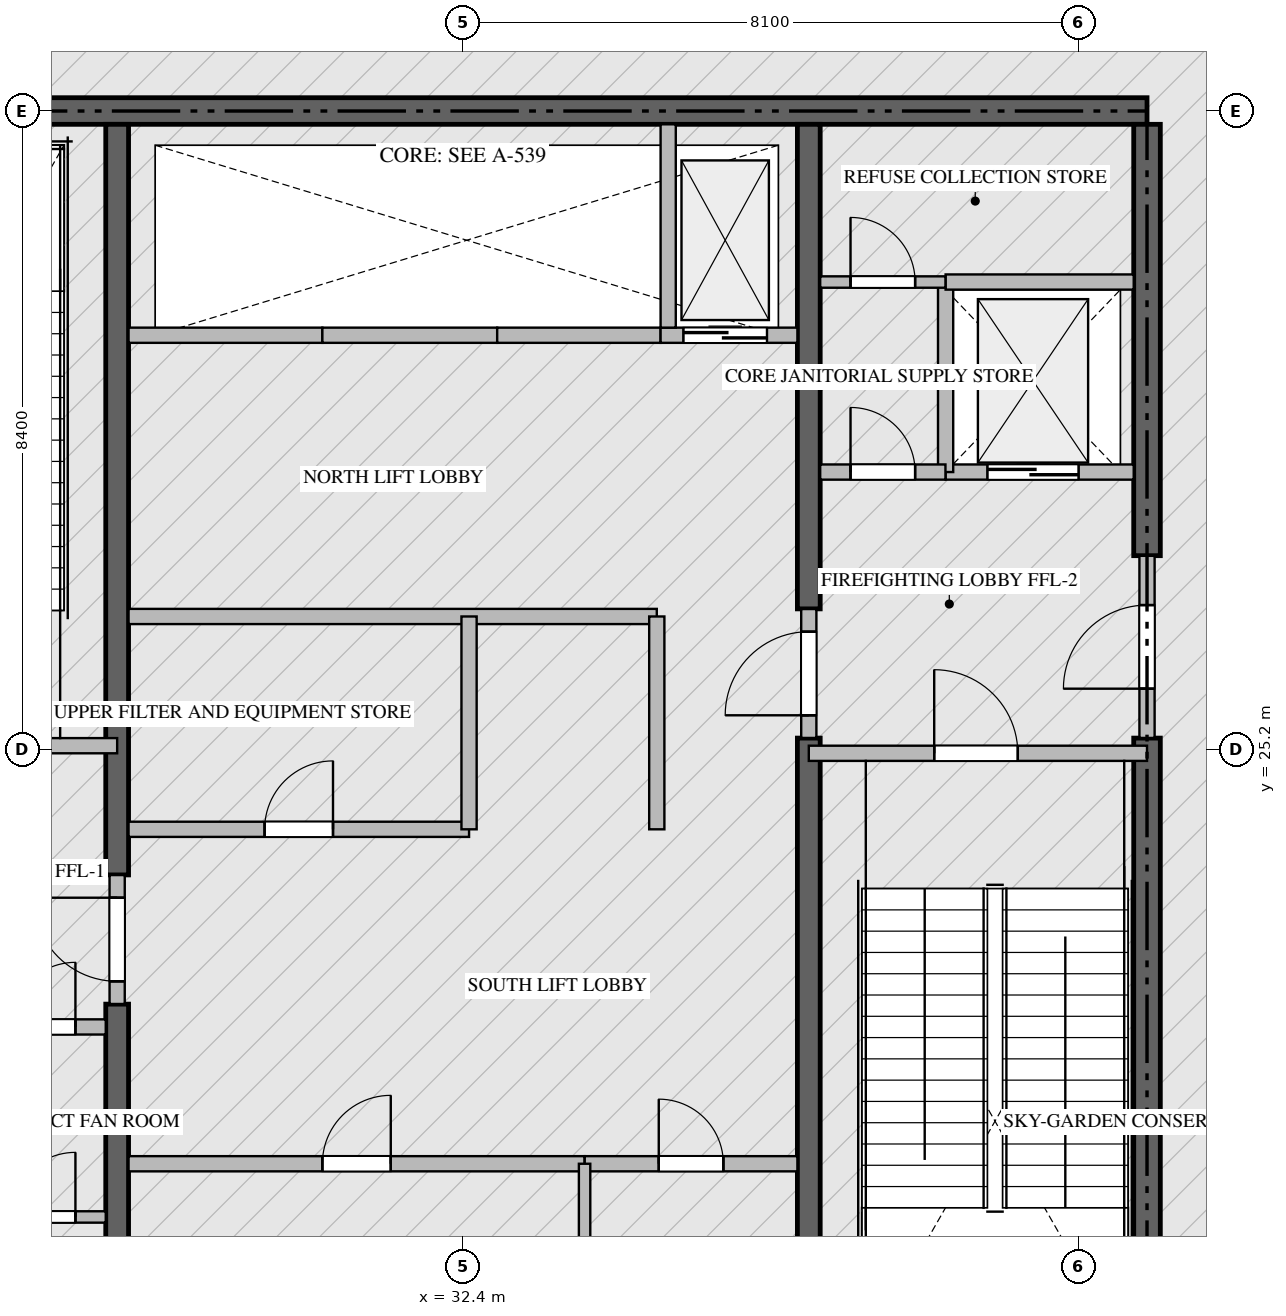
"""IFC4 building model, lengths in metres.
Left out: names, types, materials, properties, quantities, classifications, styles, units other than length and angle.
Written with IfcOpenShell. Run it as: python <this file> out.ifc"""

import sys

from ifc_helpers import new_model, si_unit, direction, frame, frame_2d, origin, place, context, subcontext, project, spatial, rectangle, extrude, source, transform, mapped, element, fill, save


model = new_model("IFC4")
c1 = context("Model", 3, precision=1e-05, world=origin(), true_north=direction((0.0, 1.0)))
c2 = subcontext(c1, "Body", "Model", "MODEL_VIEW")
j1 = project(units=[si_unit("LENGTHUNIT", "METRE"), si_unit("PLANEANGLEUNIT", "RADIAN")], contexts=[c1])
p1 = place(None, origin())
s1 = spatial("IfcSite", under=j1, at=p1, CompositionType="ELEMENT")
p2 = place(p1, origin())
s2 = spatial("IfcBuilding", under=s1, at=p2, CompositionType="ELEMENT")
p3 = place(p2, frame((0.0, 0.0, 359.75)))
s3 = spatial("IfcBuildingStorey", under=s2, at=p3, CompositionType="ELEMENT", Elevation=359.75)
p4 = place(p3, frame((41.4, 33.6, -0.36), z_axis=(0.0, 0.0, 1.0), x_axis=(-1.0, 0.0, 0.0)))
e1 = element("IfcWall", 1, at=p4, inside=s3, PredefinedType="SHEAR", context=c2, shape_type="SweptSolid", body=[
    extrude(rectangle(XDim=18.0, YDim=0.35, at=frame_2d((9.0, 0.0))), origin(), (0.0, 0.0, 1.0), 5.998),
])
p5 = place(p3, frame((41.4, 16.975, -0.36), z_axis=(0.0, 0.0, 1.0), x_axis=(0.0, 1.0, 0.0)))
e2 = element("IfcWall", 2, at=p5, inside=s3, PredefinedType="SHEAR", context=c2, shape_type="SweptSolid", body=[
    extrude(rectangle(XDim=8.375, YDim=0.35, at=frame_2d((4.188, 0.0))), origin(), (0.0, 0.0, 1.0), 5.998),
])
p6 = place(p3, frame((41.4, 27.75, -0.36), z_axis=(0.0, 0.0, 1.0), x_axis=(0.0, 1.0, 0.0)))
e3 = element("IfcWall", 3, at=p6, inside=s3, PredefinedType="SHEAR", context=c2, shape_type="SweptSolid", body=[
    extrude(rectangle(XDim=5.675, YDim=0.35, at=frame_2d((2.837, 0.0))), origin(), (0.0, 0.0, 1.0), 5.998),
])
p7 = place(p3, frame((27.85, 16.975, -0.36), z_axis=(0.0, 0.0, 1.0), x_axis=(0.0, 1.0, 0.0)))
e4 = element("IfcWall", 4, at=p7, inside=s3, PredefinedType="SHEAR", context=c2, shape_type="SweptSolid", body=[
    extrude(rectangle(XDim=4.875, YDim=0.3, at=frame_2d((2.438, 0.0))), origin(), (0.0, 0.0, 1.0), 5.998),
])
p8 = place(p3, frame((27.85, 23.55, -0.36), z_axis=(0.0, 0.0, 1.0), x_axis=(0.0, 1.0, 0.0)))
e5 = element("IfcWall", 5, at=p8, inside=s3, PredefinedType="SHEAR", context=c2, shape_type="SweptSolid", body=[
    extrude(rectangle(XDim=9.875, YDim=0.3, at=frame_2d((4.938, 0.0))), origin(), (0.0, 0.0, 1.0), 5.998),
])
p9 = place(p3, frame((36.95, 16.975, -0.36), z_axis=(0.0, 0.0, 1.0), x_axis=(0.0, 1.0, 0.0)))
e6 = element("IfcWall", 6, at=p9, inside=s3, PredefinedType="SHEAR", context=c2, shape_type="SweptSolid", body=[
    extrude(rectangle(XDim=8.375, YDim=0.3, at=frame_2d((4.188, 0.0))), origin(), (0.0, 0.0, 1.0), 5.998),
])
p10 = place(p3, frame((36.95, 27.05, -0.36), z_axis=(0.0, 0.0, 1.0), x_axis=(0.0, 1.0, 0.0)))
e7 = element("IfcWall", 7, at=p10, inside=s3, PredefinedType="SHEAR", context=c2, shape_type="SweptSolid", body=[
    extrude(rectangle(XDim=6.375, YDim=0.3, at=frame_2d((3.188, 0.0))), origin(), (0.0, 0.0, 1.0), 5.998),
])
p11 = place(p3, frame((23.4, 25.25, 0.0), z_axis=(0.0, 0.0, 1.0), x_axis=(1.0, 0.0, 0.0)))
e8 = element("IfcWall", 8, at=p11, inside=s3, PredefinedType="STANDARD", context=c2, shape_type="SweptSolid", body=[
    extrude(rectangle(XDim=4.45, YDim=0.2, at=frame_2d((2.225, 0.0))), origin(), (0.0, 0.0, 1.0), 5.64),
])
p12 = place(p11, frame((1.65, 0.0, 0.0)))
e9 = element("IfcOpeningElement", 9, at=p12, cuts=e8, PredefinedType="OPENING", context=c2, shape_type="SweptSolid", body=[
    extrude(rectangle(XDim=1.1, YDim=2.15, at=frame_2d((0.55, 1.075))), frame((0.0, 0.11, 0.0), z_axis=(0.0, -1.0, 0.0), x_axis=(1.0, 0.0, 0.0)), (0.0, 0.0, 1.0), 0.22),
])
p13 = place(p3, frame((36.95, 25.15, 0.0), z_axis=(0.0, 0.0, 1.0), x_axis=(1.0, 0.0, 0.0)))
e10 = element("IfcWall", 10, at=p13, inside=s3, PredefinedType="STANDARD", context=c2, shape_type="SweptSolid", body=[
    extrude(rectangle(XDim=4.45, YDim=0.2, at=frame_2d((2.225, 0.0))), origin(), (0.0, 0.0, 1.0), 5.64),
])
p14 = place(p13, frame((1.65, 0.0, 0.0)))
e11 = element("IfcOpeningElement", 11, at=p14, cuts=e10, PredefinedType="OPENING", context=c2, shape_type="SweptSolid", body=[
    extrude(rectangle(XDim=1.1, YDim=2.15, at=frame_2d((0.55, 1.075))), frame((0.0, 0.11, 0.0), z_axis=(0.0, -1.0, 0.0), x_axis=(1.0, 0.0, 0.0)), (0.0, 0.0, 1.0), 0.22),
])
p15 = place(p3, frame((38.75, 28.85, 0.0), z_axis=(0.0, 0.0, 1.0), x_axis=(1.0, 0.0, 0.0)))
e12 = element("IfcWall", 12, at=p15, inside=s3, PredefinedType="STANDARD", context=c2, shape_type="SweptSolid", body=[
    extrude(rectangle(XDim=2.475, YDim=0.2, at=frame_2d((1.238, 0.0))), origin(), (0.0, 0.0, 1.0), 5.64),
])
p16 = place(p15, frame((0.55, 0.0, 0.0)))
e13 = element("IfcOpeningElement", 13, at=p16, cuts=e12, PredefinedType="OPENING", context=c2, shape_type="SweptSolid", body=[
    extrude(rectangle(XDim=1.2, YDim=2.2, at=frame_2d((0.6, 1.1))), frame((0.0, 0.11, 0.0), z_axis=(0.0, -1.0, 0.0), x_axis=(1.0, 0.0, 0.0)), (0.0, 0.0, 1.0), 0.22),
])
p17 = place(p3, frame((28.0, 30.65, 0.0), z_axis=(0.0, 0.0, 1.0), x_axis=(1.0, 0.0, 0.0)))
e14 = element("IfcWall", 14, at=p17, inside=s3, PredefinedType="STANDARD", context=c2, shape_type="SweptSolid", body=[
    extrude(rectangle(XDim=2.55, YDim=0.2, at=frame_2d((1.275, 0.0))), origin(), (0.0, 0.0, 1.0), 5.64),
])
p18 = place(p3, frame((30.55, 30.65, 0.0), z_axis=(0.0, 0.0, 1.0), x_axis=(1.0, 0.0, 0.0)))
e15 = element("IfcWall", 15, at=p18, inside=s3, PredefinedType="STANDARD", context=c2, shape_type="SweptSolid", body=[
    extrude(rectangle(XDim=2.3, YDim=0.2, at=frame_2d((1.15, 0.0))), origin(), (0.0, 0.0, 1.0), 5.64),
])
p19 = place(p3, frame((32.85, 30.65, 0.0), z_axis=(0.0, 0.0, 1.0), x_axis=(1.0, 0.0, 0.0)))
e16 = element("IfcWall", 16, at=p19, inside=s3, PredefinedType="STANDARD", context=c2, shape_type="SweptSolid", body=[
    extrude(rectangle(XDim=2.15, YDim=0.2, at=frame_2d((1.075, 0.0))), origin(), (0.0, 0.0, 1.0), 5.64),
])
p20 = place(p3, frame((35.0, 30.65, 0.0), z_axis=(0.0, 0.0, 1.0), x_axis=(1.0, 0.0, 0.0)))
e17 = element("IfcWall", 17, at=p20, inside=s3, PredefinedType="STANDARD", context=c2, shape_type="SweptSolid", body=[
    extrude(rectangle(XDim=1.8, YDim=0.2, at=frame_2d((0.9, 0.0))), origin(), (0.0, 0.0, 1.0), 5.64),
])
p21 = place(p20, frame((0.3, 0.0, 0.0)))
e18 = element("IfcOpeningElement", 18, at=p21, cuts=e17, PredefinedType="OPENING", context=c2, shape_type="SweptSolid", body=[
    extrude(rectangle(XDim=1.1, YDim=2.2, at=frame_2d((0.55, 1.1))), frame((0.0, 0.11, 0.0), z_axis=(0.0, -1.0, 0.0), x_axis=(1.0, 0.0, 0.0)), (0.0, 0.0, 1.0), 0.22),
])
p22 = place(p3, frame((35.1, 30.75, 0.0), z_axis=(0.0, 0.0, 1.0), x_axis=(0.0, 1.0, 0.0)))
e19 = element("IfcWall", 19, at=p22, inside=s3, PredefinedType="STANDARD", context=c2, shape_type="SweptSolid", body=[
    extrude(rectangle(XDim=2.675, YDim=0.2, at=frame_2d((1.337, 0.0))), origin(), (0.0, 0.0, 1.0), 5.64),
])
p23 = place(p3, frame((26.052, 21.55, 0.0), z_axis=(0.0, 0.0, 1.0), x_axis=(1.0, 0.0, 0.0)))
e20 = element("IfcWall", 20, at=p23, inside=s3, PredefinedType="STANDARD", context=c2, shape_type="SweptSolid", body=[
    extrude(rectangle(XDim=1.648, YDim=0.2, at=frame_2d((0.824, 0.0))), origin(), (0.0, 0.0, 1.0), 5.64),
])
p24 = place(p23, frame((0.399, 0.0, 0.0)))
e21 = element("IfcOpeningElement", 21, at=p24, cuts=e20, PredefinedType="OPENING", context=c2, shape_type="SweptSolid", body=[
    extrude(rectangle(XDim=0.85, YDim=2.1, at=frame_2d((0.425, 1.05))), frame((0.0, 0.11, 0.0), z_axis=(0.0, -1.0, 0.0), x_axis=(1.0, 0.0, 0.0)), (0.0, 0.0, 1.0), 0.22),
])
p25 = place(p3, frame((38.75, 28.85, 0.0), z_axis=(0.0, 0.0, 1.0), x_axis=(0.0, 1.0, 0.0)))
e22 = element("IfcWall", 22, at=p25, inside=s3, PredefinedType="STANDARD", context=c2, shape_type="SweptSolid", body=[
    extrude(rectangle(XDim=2.5, YDim=0.2, at=frame_2d((1.25, 0.0))), origin(), (0.0, 0.0, 1.0), 5.64),
])
p26 = place(p3, frame((38.75, 31.35, 0.0), z_axis=(0.0, 0.0, 1.0), x_axis=(1.0, 0.0, 0.0)))
e23 = element("IfcWall", 23, at=p26, inside=s3, PredefinedType="STANDARD", context=c2, shape_type="SweptSolid", body=[
    extrude(rectangle(XDim=2.475, YDim=0.2, at=frame_2d((1.238, 0.0))), origin(), (0.0, 0.0, 1.0), 5.64),
])
p27 = place(p3, frame((37.1, 28.85, 0.0), z_axis=(0.0, 0.0, 1.0), x_axis=(1.0, 0.0, 0.0)))
e24 = element("IfcWall", 24, at=p27, inside=s3, PredefinedType="STANDARD", context=c2, shape_type="SweptSolid", body=[
    extrude(rectangle(XDim=1.648, YDim=0.2, at=frame_2d((0.824, 0.0))), origin(), (0.0, 0.0, 1.0), 5.64),
])
p28 = place(p27, frame((0.399, 0.0, 0.0)))
e25 = element("IfcOpeningElement", 25, at=p28, cuts=e24, PredefinedType="OPENING", context=c2, shape_type="SweptSolid", body=[
    extrude(rectangle(XDim=0.85, YDim=2.1, at=frame_2d((0.425, 1.05))), frame((0.0, 0.11, 0.0), z_axis=(0.0, -1.0, 0.0), x_axis=(1.0, 0.0, 0.0)), (0.0, 0.0, 1.0), 0.22),
])
p29 = place(p3, frame((41.4, 25.352, 0.0), z_axis=(0.0, 0.0, 1.0), x_axis=(0.0, 1.0, 0.0)))
e26 = element("IfcWall", 26, at=p29, inside=s3, PredefinedType="STANDARD", context=c2, shape_type="SweptSolid", body=[
    extrude(rectangle(XDim=2.396, YDim=0.2, at=frame_2d((1.198, 0.0))), origin(), (0.0, 0.0, 1.0), 5.64),
])
p30 = place(p29, frame((0.648, 0.0, 0.0)))
e27 = element("IfcOpeningElement", 27, at=p30, cuts=e26, PredefinedType="OPENING", context=c2, shape_type="SweptSolid", body=[
    extrude(rectangle(XDim=1.1, YDim=2.15, at=frame_2d((0.55, 1.075))), frame((0.0, 0.11, 0.0), z_axis=(0.0, -1.0, 0.0), x_axis=(1.0, 0.0, 0.0)), (0.0, 0.0, 1.0), 0.22),
])
p31 = place(p3, frame((27.85, 21.852, 0.0), z_axis=(0.0, 0.0, 1.0), x_axis=(0.0, 1.0, 0.0)))
e28 = element("IfcWall", 28, at=p31, inside=s3, PredefinedType="STANDARD", context=c2, shape_type="SweptSolid", body=[
    extrude(rectangle(XDim=1.696, YDim=0.2, at=frame_2d((0.848, 0.0))), origin(), (0.0, 0.0, 1.0), 5.64),
])
p32 = place(p31, frame((0.298, 0.0, 0.0)))
e29 = element("IfcOpeningElement", 29, at=p32, cuts=e28, PredefinedType="OPENING", context=c2, shape_type="SweptSolid", body=[
    extrude(rectangle(XDim=1.1, YDim=2.15, at=frame_2d((0.55, 1.075))), frame((0.0, 0.11, 0.0), z_axis=(0.0, -1.0, 0.0), x_axis=(1.0, 0.0, 0.0)), (0.0, 0.0, 1.0), 0.22),
])
p33 = place(p3, frame((36.95, 25.352, 0.0), z_axis=(0.0, 0.0, 1.0), x_axis=(0.0, 1.0, 0.0)))
e30 = element("IfcWall", 30, at=p33, inside=s3, PredefinedType="STANDARD", context=c2, shape_type="SweptSolid", body=[
    extrude(rectangle(XDim=1.696, YDim=0.2, at=frame_2d((0.848, 0.0))), origin(), (0.0, 0.0, 1.0), 5.64),
])
p34 = place(p33, frame((0.298, 0.0, 0.0)))
e31 = element("IfcOpeningElement", 31, at=p34, cuts=e30, PredefinedType="OPENING", context=c2, shape_type="SweptSolid", body=[
    extrude(rectangle(XDim=1.1, YDim=2.15, at=frame_2d((0.55, 1.075))), frame((0.0, 0.11, 0.0), z_axis=(0.0, -1.0, 0.0), x_axis=(1.0, 0.0, 0.0)), (0.0, 0.0, 1.0), 0.22),
])
p35 = place(p3, frame((26.052, 19.05, 0.0), z_axis=(0.0, 0.0, 1.0), x_axis=(1.0, 0.0, 0.0)))
e32 = element("IfcWall", 32, at=p35, inside=s3, PredefinedType="PARTITIONING", context=c2, shape_type="SweptSolid", body=[
    extrude(rectangle(XDim=1.648, YDim=0.15, at=frame_2d((0.824, 0.0))), origin(), (0.0, 0.0, 1.0), 5.64),
])
p36 = place(p35, frame((0.399, 0.0, 0.0)))
e33 = element("IfcOpeningElement", 33, at=p36, cuts=e32, PredefinedType="OPENING", context=c2, shape_type="SweptSolid", body=[
    extrude(rectangle(XDim=0.85, YDim=2.1, at=frame_2d((0.425, 1.05))), frame((0.0, 0.085, 0.0), z_axis=(0.0, -1.0, 0.0), x_axis=(1.0, 0.0, 0.0)), (0.0, 0.0, 1.0), 0.17),
])
p37 = place(p3, frame((37.1, 31.35, 0.0), z_axis=(0.0, 0.0, 1.0), x_axis=(1.0, 0.0, 0.0)))
e34 = element("IfcWall", 34, at=p37, inside=s3, PredefinedType="PARTITIONING", context=c2, shape_type="SweptSolid", body=[
    extrude(rectangle(XDim=1.648, YDim=0.15, at=frame_2d((0.824, 0.0))), origin(), (0.0, 0.0, 1.0), 5.64),
])
p38 = place(p37, frame((0.399, 0.0, 0.0)))
e35 = element("IfcOpeningElement", 35, at=p38, cuts=e34, PredefinedType="OPENING", context=c2, shape_type="SweptSolid", body=[
    extrude(rectangle(XDim=0.85, YDim=2.1, at=frame_2d((0.425, 1.05))), frame((0.0, 0.085, 0.0), z_axis=(0.0, -1.0, 0.0), x_axis=(1.0, 0.0, 0.0)), (0.0, 0.0, 1.0), 0.17),
])
p39 = place(p3, frame((28.0, 19.75, 0.0), z_axis=(0.0, 0.0, 1.0), x_axis=(1.0, 0.0, 0.0)))
e36 = element("IfcWall", 36, at=p39, inside=s3, PredefinedType="STANDARD", context=c2, shape_type="SweptSolid", body=[
    extrude(rectangle(XDim=6.0, YDim=0.2, at=frame_2d((3.0, 0.0))), origin(), (0.0, 0.0, 1.0), 5.64),
])
p40 = place(p39, frame((2.55, 0.0, 0.0)))
e37 = element("IfcOpeningElement", 37, at=p40, cuts=e36, PredefinedType="OPENING", context=c2, shape_type="SweptSolid", body=[
    extrude(rectangle(XDim=0.9, YDim=2.1, at=frame_2d((0.45, 1.05))), frame((0.0, 0.11, 0.0), z_axis=(0.0, -1.0, 0.0), x_axis=(1.0, 0.0, 0.0)), (0.0, 0.0, 1.0), 0.22),
])
p41 = place(p3, frame((34.002, 19.75, 0.0), z_axis=(0.0, 0.0, 1.0), x_axis=(1.0, 0.0, 0.0)))
e38 = element("IfcWall", 38, at=p41, inside=s3, PredefinedType="STANDARD", context=c2, shape_type="SweptSolid", body=[
    extrude(rectangle(XDim=2.798, YDim=0.2, at=frame_2d((1.399, 0.0))), origin(), (0.0, 0.0, 1.0), 5.64),
])
p42 = place(p41, frame((0.974, 0.0, 0.0)))
e39 = element("IfcOpeningElement", 39, at=p42, cuts=e38, PredefinedType="OPENING", context=c2, shape_type="SweptSolid", body=[
    extrude(rectangle(XDim=0.85, YDim=2.1, at=frame_2d((0.425, 1.05))), frame((0.0, 0.11, 0.0), z_axis=(0.0, -1.0, 0.0), x_axis=(1.0, 0.0, 0.0)), (0.0, 0.0, 1.0), 0.22),
])
p43 = place(p3, frame((34.0, 17.02, 0.0), z_axis=(0.0, 0.0, 1.0), x_axis=(0.0, 1.0, 0.0)))
e40 = element("IfcWall", 40, at=p43, inside=s3, PredefinedType="PARTITIONING", context=c2, shape_type="SweptSolid", body=[
    extrude(rectangle(XDim=2.73, YDim=0.15, at=frame_2d((1.365, 0.0))), origin(), (0.0, 0.0, 1.0), 5.64),
])
p44 = place(p3, frame((28.0, 26.95, 0.0), z_axis=(0.0, 0.0, 1.0), x_axis=(1.0, 0.0, 0.0)))
e41 = element("IfcWall", 41, at=p44, inside=s3, PredefinedType="STANDARD", context=c2, shape_type="SweptSolid", body=[
    extrude(rectangle(XDim=6.95, YDim=0.2, at=frame_2d((3.475, 0.0))), origin(), (0.0, 0.0, 1.0), 5.64),
])
p45 = place(p3, frame((34.95, 24.15, 0.0), z_axis=(0.0, 0.0, 1.0), x_axis=(0.0, 1.0, 0.0)))
e42 = element("IfcWall", 42, at=p45, inside=s3, PredefinedType="STANDARD", context=c2, shape_type="SweptSolid", body=[
    extrude(rectangle(XDim=2.8, YDim=0.2, at=frame_2d((1.4, 0.0))), origin(), (0.0, 0.0, 1.0), 5.64),
])
p46 = place(p3, frame((28.0, 24.15, 0.0), z_axis=(0.0, 0.0, 1.0), x_axis=(1.0, 0.0, 0.0)))
e43 = element("IfcWall", 43, at=p46, inside=s3, PredefinedType="STANDARD", context=c2, shape_type="SweptSolid", body=[
    extrude(rectangle(XDim=4.48, YDim=0.2, at=frame_2d((2.24, 0.0))), origin(), (0.0, 0.0, 1.0), 5.64),
])
p47 = place(p46, frame((1.79, 0.0, 0.0)))
e44 = element("IfcOpeningElement", 44, at=p47, cuts=e43, PredefinedType="OPENING", context=c2, shape_type="SweptSolid", body=[
    extrude(rectangle(XDim=0.9, YDim=2.1, at=frame_2d((0.45, 1.05))), frame((0.0, 0.11, 0.0), z_axis=(0.0, -1.0, 0.0), x_axis=(1.0, 0.0, 0.0)), (0.0, 0.0, 1.0), 0.22),
])
p48 = place(p3, frame((32.48, 24.15, 0.0), z_axis=(0.0, 0.0, 1.0), x_axis=(0.0, 1.0, 0.0)))
e45 = element("IfcWall", 45, at=p48, inside=s3, PredefinedType="STANDARD", context=c2, shape_type="SweptSolid", body=[
    extrude(rectangle(XDim=2.8, YDim=0.2, at=frame_2d((1.4, 0.0))), origin(), (0.0, 0.0, 1.0), 5.64),
])
m1 = source(origin(), c2, "Body", "SweptSolid", [
    extrude(rectangle(XDim=1.1, YDim=2.15, at=frame_2d((0.55, 1.075))), frame((0.0, 0.025, 0.0), z_axis=(0.0, -1.0, 0.0), x_axis=(1.0, 0.0, 0.0)), (0.0, 0.0, 1.0), 0.05),
])
p49 = place(p14, origin())
e46 = element("IfcDoor", 46, at=p49, inside=s3, OperationType="SINGLE_SWING_LEFT", PredefinedType="DOOR", context=c2, shape_type="MappedRepresentation", body=[
    mapped(m1, transform((0.0, 0.0, 0.0), scale=1.0)),
])
fill(e11, e46)
m2 = source(origin(), c2, "Body", "SweptSolid", [
    extrude(rectangle(XDim=1.2, YDim=2.2, at=frame_2d((0.6, 1.1))), frame((0.0, 0.025, 0.0), z_axis=(0.0, -1.0, 0.0), x_axis=(1.0, 0.0, 0.0)), (0.0, 0.0, 1.0), 0.05),
])
p50 = place(p16, origin())
e47 = element("IfcDoor", 47, at=p50, inside=s3, OperationType="DOUBLE_DOOR_SLIDING", PredefinedType="DOOR", context=c2, shape_type="MappedRepresentation", body=[
    mapped(m2, transform((0.0, 0.0, 0.0), scale=1.0)),
])
fill(e13, e47)
m3 = source(origin(), c2, "Body", "SweptSolid", [
    extrude(rectangle(XDim=1.1, YDim=2.2, at=frame_2d((0.55, 1.1))), frame((0.0, 0.025, 0.0), z_axis=(0.0, -1.0, 0.0), x_axis=(1.0, 0.0, 0.0)), (0.0, 0.0, 1.0), 0.05),
])
p51 = place(p21, origin())
e48 = element("IfcDoor", 48, at=p51, inside=s3, OperationType="DOUBLE_DOOR_SLIDING", PredefinedType="DOOR", context=c2, shape_type="MappedRepresentation", body=[
    mapped(m3, transform((0.0, 0.0, 0.0), scale=1.0)),
])
fill(e18, e48)
m4 = source(origin(), c2, "Body", "SweptSolid", [
    extrude(rectangle(XDim=0.85, YDim=2.1, at=frame_2d((0.425, 1.05))), frame((0.0, 0.025, 0.0), z_axis=(0.0, -1.0, 0.0), x_axis=(1.0, 0.0, 0.0)), (0.0, 0.0, 1.0), 0.05),
])
p52 = place(p24, origin())
e49 = element("IfcDoor", 49, at=p52, inside=s3, OperationType="SINGLE_SWING_RIGHT", PredefinedType="DOOR", context=c2, shape_type="MappedRepresentation", body=[
    mapped(m4, transform((0.0, 0.0, 0.0), scale=1.0)),
])
fill(e21, e49)
p53 = place(p28, origin())
e50 = element("IfcDoor", 50, at=p53, inside=s3, OperationType="SINGLE_SWING_LEFT", PredefinedType="DOOR", context=c2, shape_type="MappedRepresentation", body=[
    mapped(m4, transform((0.0, 0.0, 0.0), scale=1.0)),
])
fill(e25, e50)
p54 = place(p30, origin())
e51 = element("IfcDoor", 51, at=p54, inside=s3, OperationType="SINGLE_SWING_LEFT", PredefinedType="DOOR", context=c2, shape_type="MappedRepresentation", body=[
    mapped(m1, transform((0.0, 0.0, 0.0), scale=1.0)),
])
fill(e27, e51)
p55 = place(p32, origin())
e52 = element("IfcDoor", 52, at=p55, inside=s3, OperationType="SINGLE_SWING_RIGHT", PredefinedType="DOOR", context=c2, shape_type="MappedRepresentation", body=[
    mapped(m1, transform((0.0, 0.0, 0.0), scale=1.0)),
])
fill(e29, e52)
p56 = place(p34, origin())
e53 = element("IfcDoor", 53, at=p56, inside=s3, OperationType="SINGLE_SWING_LEFT", PredefinedType="DOOR", context=c2, shape_type="MappedRepresentation", body=[
    mapped(m1, transform((0.0, 0.0, 0.0), scale=1.0)),
])
fill(e31, e53)
p57 = place(p36, origin())
e54 = element("IfcDoor", 54, at=p57, inside=s3, OperationType="SINGLE_SWING_RIGHT", PredefinedType="DOOR", context=c2, shape_type="MappedRepresentation", body=[
    mapped(m4, transform((0.0, 0.0, 0.0), scale=1.0)),
])
fill(e33, e54)
p58 = place(p38, origin())
e55 = element("IfcDoor", 55, at=p58, inside=s3, OperationType="SINGLE_SWING_LEFT", PredefinedType="DOOR", context=c2, shape_type="MappedRepresentation", body=[
    mapped(m4, transform((0.0, 0.0, 0.0), scale=1.0)),
])
fill(e35, e55)
m5 = source(origin(), c2, "Body", "SweptSolid", [
    extrude(rectangle(XDim=0.9, YDim=2.1, at=frame_2d((0.45, 1.05))), frame((0.0, 0.025, 0.0), z_axis=(0.0, -1.0, 0.0), x_axis=(1.0, 0.0, 0.0)), (0.0, 0.0, 1.0), 0.05),
])
p59 = place(p40, origin())
e56 = element("IfcDoor", 56, at=p59, inside=s3, OperationType="SINGLE_SWING_RIGHT", PredefinedType="DOOR", context=c2, shape_type="MappedRepresentation", body=[
    mapped(m5, transform((0.0, 0.0, 0.0), scale=1.0)),
])
fill(e37, e56)
p60 = place(p42, origin())
e57 = element("IfcDoor", 57, at=p60, inside=s3, OperationType="SINGLE_SWING_LEFT", PredefinedType="DOOR", context=c2, shape_type="MappedRepresentation", body=[
    mapped(m4, transform((0.0, 0.0, 0.0), scale=1.0)),
])
fill(e39, e57)
p61 = place(p47, origin())
e58 = element("IfcDoor", 58, at=p61, inside=s3, OperationType="SINGLE_SWING_RIGHT", PredefinedType="DOOR", context=c2, shape_type="MappedRepresentation", body=[
    mapped(m5, transform((0.0, 0.0, 0.0), scale=1.0)),
])
fill(e44, e58)
save(model, sys.argv[1])
